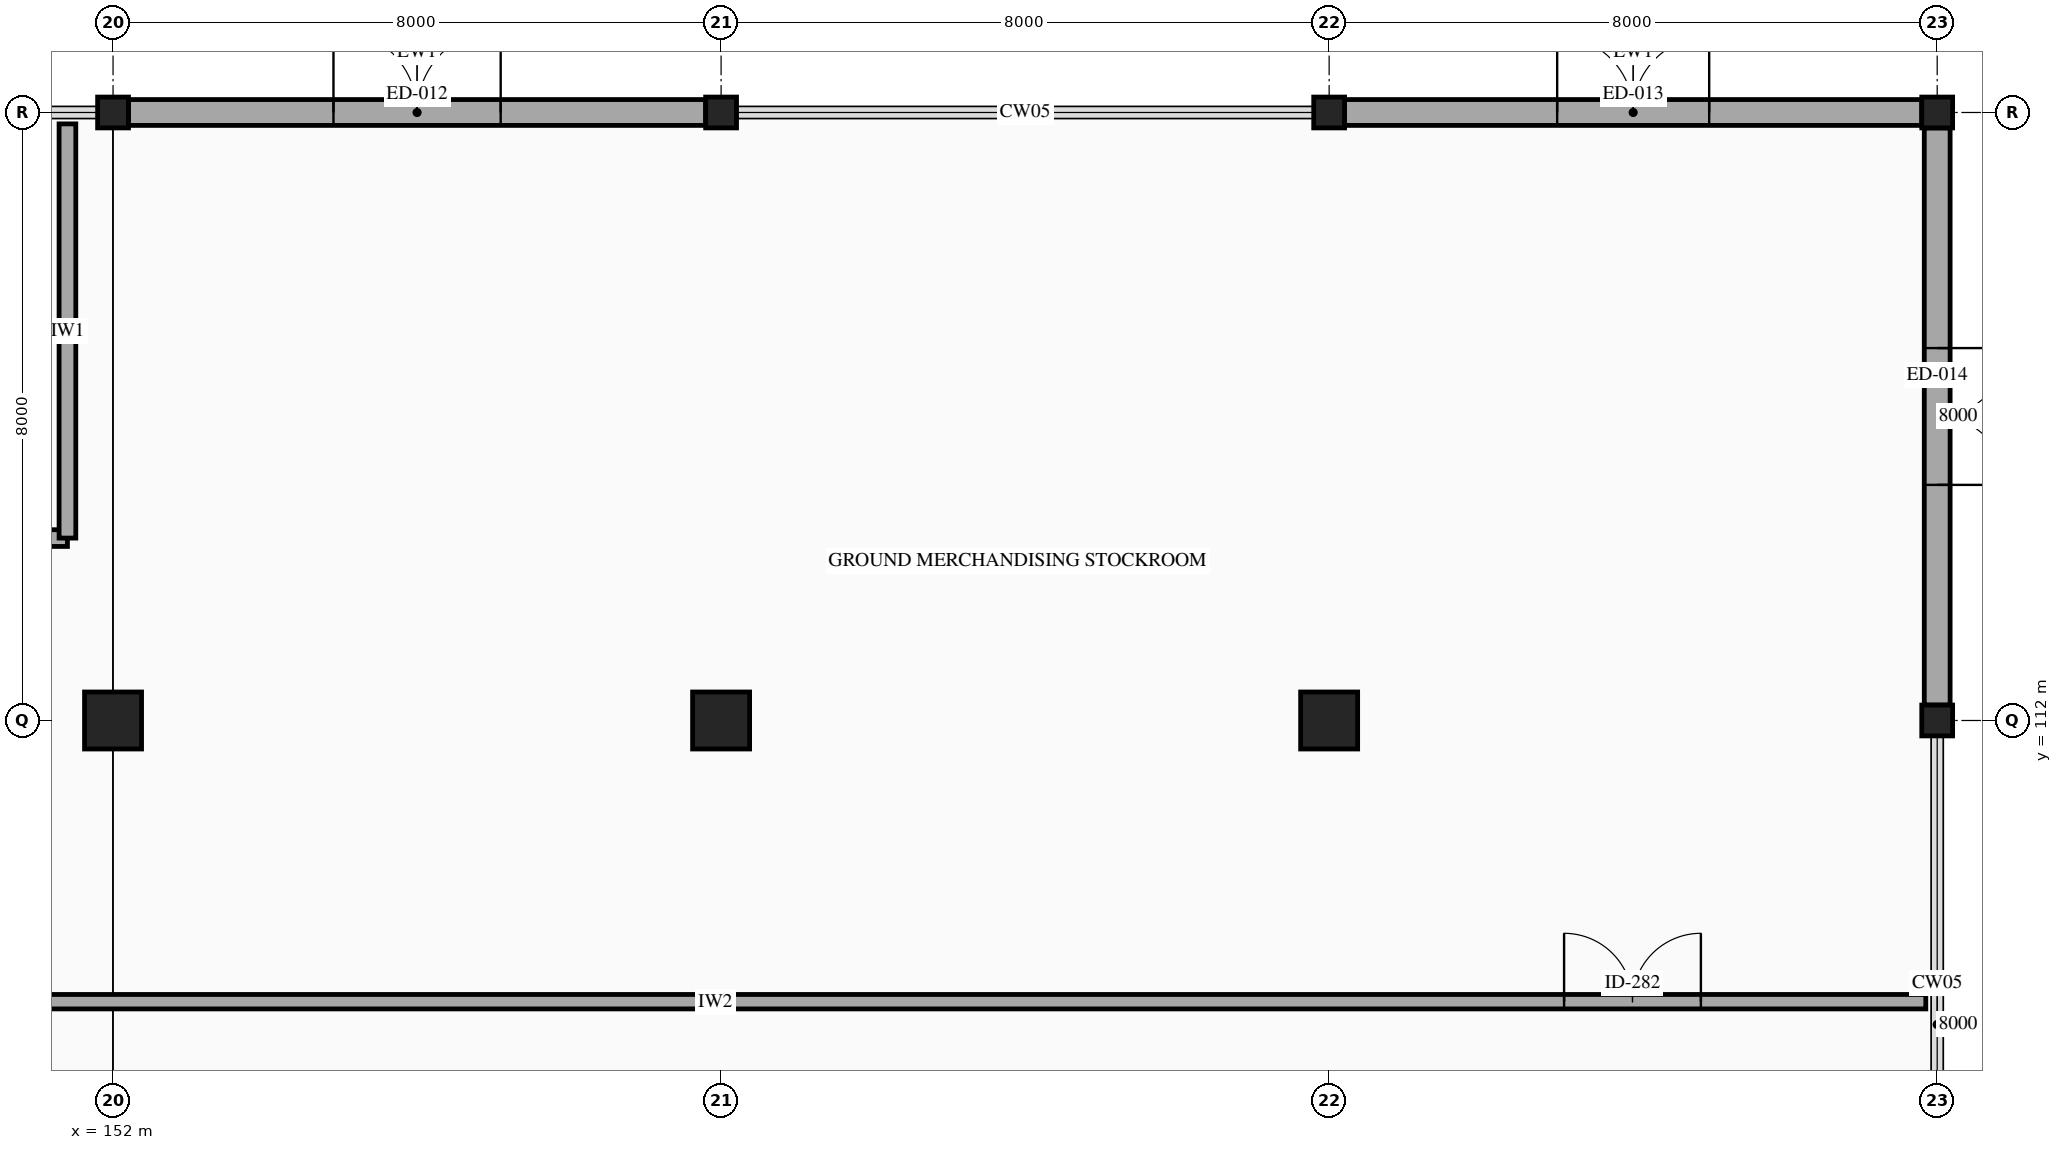
"""IFC4 building model, lengths in metres.
Left out: names, types, materials, properties, quantities, classifications, styles, units other than length and angle.
Written with IfcOpenShell. Run it as: python <this file> out.ifc"""

import sys

from ifc_helpers import new_model, si_unit, direction, frame, frame_2d, origin, origin_2d, place, context, subcontext, project, spatial, rectangle, hollow_rectangle, extrude, element, fill, save


model = new_model("IFC4")
c1 = context("Model", 3, precision=1e-05, world=origin(), true_north=direction((0.0, 1.0)))
c2 = subcontext(c1, "Body", "Model", "MODEL_VIEW")
j1 = project(units=[si_unit("LENGTHUNIT", "METRE"), si_unit("PLANEANGLEUNIT", "RADIAN")], contexts=[c1])
p1 = place(None, origin())
s1 = spatial("IfcSite", under=j1, at=p1, CompositionType="ELEMENT")
p2 = place(p1, origin())
s2 = spatial("IfcBuilding", under=s1, at=p2, CompositionType="ELEMENT")
p3 = place(p2, origin())
s3 = spatial("IfcBuildingStorey", under=s2, at=p3, CompositionType="ELEMENT", Elevation=0.0)
p4 = place(p3, frame((152.0, 112.0, 0.0), z_axis=(0.0, 0.0, 1.0), x_axis=(1.0, 0.0, 0.0)))
e1 = element("IfcColumn", 1, at=p4, inside=s3, PredefinedType="COLUMN", context=c2, shape_type="SweptSolid", body=[
    extrude(rectangle(XDim=0.75, YDim=0.75, at=origin_2d()), origin(), (0.0, 0.0, 1.0), 5.6),
])
p5 = place(p3, frame((152.0, 120.0, 0.0), z_axis=(0.0, 0.0, 1.0), x_axis=(1.0, 0.0, 0.0)))
e2 = element("IfcColumn", 2, at=p5, inside=s3, PredefinedType="COLUMN", context=c2, shape_type="SweptSolid", body=[
    extrude(hollow_rectangle(XDim=0.406, YDim=0.406, WallThickness=0.015, InnerFilletRadius=0.015, OuterFilletRadius=0.029, at=origin_2d()), origin(), (0.0, 0.0, 1.0), 5.6),
])
p6 = place(p3, frame((160.0, 112.0, 0.0), z_axis=(0.0, 0.0, 1.0), x_axis=(1.0, 0.0, 0.0)))
e3 = element("IfcColumn", 3, at=p6, inside=s3, PredefinedType="COLUMN", context=c2, shape_type="SweptSolid", body=[
    extrude(rectangle(XDim=0.75, YDim=0.75, at=origin_2d()), origin(), (0.0, 0.0, 1.0), 5.6),
])
p7 = place(p3, frame((160.0, 120.0, 0.0), z_axis=(0.0, 0.0, 1.0), x_axis=(1.0, 0.0, 0.0)))
e4 = element("IfcColumn", 4, at=p7, inside=s3, PredefinedType="COLUMN", context=c2, shape_type="SweptSolid", body=[
    extrude(hollow_rectangle(XDim=0.406, YDim=0.406, WallThickness=0.015, InnerFilletRadius=0.015, OuterFilletRadius=0.029, at=origin_2d()), origin(), (0.0, 0.0, 1.0), 5.6),
])
p8 = place(p3, frame((168.0, 112.0, 0.0), z_axis=(0.0, 0.0, 1.0), x_axis=(1.0, 0.0, 0.0)))
e5 = element("IfcColumn", 5, at=p8, inside=s3, PredefinedType="COLUMN", context=c2, shape_type="SweptSolid", body=[
    extrude(rectangle(XDim=0.75, YDim=0.75, at=origin_2d()), origin(), (0.0, 0.0, 1.0), 5.6),
])
for number, where, z_axis, x_axis in (
    (6, (168.0, 120.0, 0.0), (0.0, 0.0, 1.0), (1.0, 0.0, 0.0)),
    (7, (176.0, 112.0, 0.0), (0.0, 0.0, 1.0), (1.0, 0.0, 0.0)),
    (8, (176.0, 120.0, 0.0), (0.0, 0.0, 1.0), (1.0, 0.0, 0.0)),
):
    element("IfcColumn", number, at=place(p3, frame(where, z_axis=z_axis, x_axis=x_axis)), inside=s3, PredefinedType="COLUMN", context=c2, shape_type="SweptSolid", body=[
        extrude(hollow_rectangle(XDim=0.406, YDim=0.406, WallThickness=0.015, InnerFilletRadius=0.015, OuterFilletRadius=0.029, at=origin_2d()), origin(), (0.0, 0.0, 1.0), 5.6),
    ])
p9 = place(p3, frame((152.203, 120.0, 0.0), z_axis=(0.0, 0.0, 1.0), x_axis=(1.0, 0.0, 0.0)))
e9 = element("IfcWall", 9, at=p9, inside=s3, PredefinedType="STANDARD", context=c2, shape_type="SweptSolid", body=[
    extrude(rectangle(XDim=7.594, YDim=0.34, at=frame_2d((3.797, 0.0))), origin(), (0.0, 0.0, 1.0), 4.58),
])
p10 = place(p9, frame((2.697, 0.0, 0.0)))
e10 = element("IfcOpeningElement", 10, at=p10, cuts=e9, PredefinedType="OPENING", context=c2, shape_type="SweptSolid", body=[
    extrude(rectangle(XDim=2.2, YDim=2.45, at=frame_2d((1.1, 1.225))), frame((0.0, 0.18, 0.0), z_axis=(0.0, -1.0, 0.0), x_axis=(1.0, 0.0, 0.0)), (0.0, 0.0, 1.0), 0.36),
])
p11 = place(p3, frame((168.203, 120.0, 0.0), z_axis=(0.0, 0.0, 1.0), x_axis=(1.0, 0.0, 0.0)))
e11 = element("IfcWall", 11, at=p11, inside=s3, PredefinedType="STANDARD", context=c2, shape_type="SweptSolid", body=[
    extrude(rectangle(XDim=7.594, YDim=0.34, at=frame_2d((3.797, 0.0))), origin(), (0.0, 0.0, 1.0), 4.58),
])
p12 = place(p11, frame((2.797, 0.0, 0.0)))
e12 = element("IfcOpeningElement", 12, at=p12, cuts=e11, PredefinedType="OPENING", context=c2, shape_type="SweptSolid", body=[
    extrude(rectangle(XDim=2.0, YDim=2.35, at=frame_2d((1.0, 1.175))), frame((0.0, 0.18, 0.0), z_axis=(0.0, -1.0, 0.0), x_axis=(1.0, 0.0, 0.0)), (0.0, 0.0, 1.0), 0.36),
])
p13 = place(p3, frame((176.0, 119.797, 0.0), z_axis=(0.0, 0.0, 1.0), x_axis=(0.0, -1.0, 0.0)))
e13 = element("IfcWall", 13, at=p13, inside=s3, PredefinedType="STANDARD", context=c2, shape_type="SweptSolid", body=[
    extrude(rectangle(XDim=7.594, YDim=0.34, at=frame_2d((3.797, 0.0))), origin(), (0.0, 0.0, 1.0), 4.58),
])
p14 = place(p13, frame((2.897, 0.0, 0.0)))
e14 = element("IfcOpeningElement", 14, at=p14, cuts=e13, PredefinedType="OPENING", context=c2, shape_type="SweptSolid", body=[
    extrude(rectangle(XDim=1.8, YDim=2.3, at=frame_2d((0.9, 1.15))), frame((0.0, 0.18, 0.0), z_axis=(0.0, -1.0, 0.0), x_axis=(1.0, 0.0, 0.0)), (0.0, 0.0, 1.0), 0.36),
])
p15 = place(p3, frame((144.0, 114.4, 0.0), z_axis=(0.0, 0.0, 1.0), x_axis=(1.0, 0.0, 0.0)))
e15 = element("IfcWall", 15, at=p15, inside=s3, PredefinedType="PARTITIONING", context=c2, shape_type="SweptSolid", body=[
    extrude(rectangle(XDim=7.4, YDim=0.22, at=frame_2d((3.7, 0.0))), origin(), (0.0, 0.0, 1.0), 4.58),
])
p16 = place(p15, frame((3.579, 0.0, 0.0)))
e16 = element("IfcOpeningElement", 16, at=p16, cuts=e15, PredefinedType="OPENING", context=c2, shape_type="SweptSolid", body=[
    extrude(rectangle(XDim=1.05, YDim=2.15, at=frame_2d((0.525, 1.075))), frame((0.0, 0.12, 0.0), z_axis=(0.0, -1.0, 0.0), x_axis=(1.0, 0.0, 0.0)), (0.0, 0.0, 1.0), 0.24),
])
p17 = place(p3, frame((151.4, 114.4, 0.0), z_axis=(0.0, 0.0, 1.0), x_axis=(0.0, 1.0, 0.0)))
e17 = element("IfcWall", 17, at=p17, inside=s3, PredefinedType="PARTITIONING", context=c2, shape_type="SweptSolid", body=[
    extrude(rectangle(XDim=5.45, YDim=0.22, at=frame_2d((2.725, 0.0))), origin(), (0.0, 0.0, 1.0), 4.58),
])
p18 = place(p3, frame((144.0, 108.3, 0.0), z_axis=(0.0, 0.0, 1.0), x_axis=(1.0, 0.0, 0.0)))
e18 = element("IfcWall", 18, at=p18, inside=s3, PredefinedType="PARTITIONING", context=c2, shape_type="SweptSolid", body=[
    extrude(rectangle(XDim=31.85, YDim=0.19, at=frame_2d((15.925, 0.0))), origin(), (0.0, 0.0, 1.0), 4.58),
])
p19 = place(p18, frame((27.091, 0.0, 0.0)))
e19 = element("IfcOpeningElement", 19, at=p19, cuts=e18, PredefinedType="OPENING", context=c2, shape_type="SweptSolid", body=[
    extrude(rectangle(XDim=1.8, YDim=2.25, at=frame_2d((0.9, 1.125))), frame((0.0, 0.105, 0.0), z_axis=(0.0, -1.0, 0.0), x_axis=(1.0, 0.0, 0.0)), (0.0, 0.0, 1.0), 0.21),
])
p20 = place(p10, origin())
e20 = element("IfcDoor", 20, at=p20, inside=s3, OperationType="DOUBLE_DOOR_SINGLE_SWING", PredefinedType="DOOR", context=c2, shape_type="SweptSolid", body=[
    extrude(rectangle(XDim=2.2, YDim=2.45, at=frame_2d((1.1, 1.225))), frame((0.0, 0.025, 0.0), z_axis=(0.0, -1.0, 0.0), x_axis=(1.0, 0.0, 0.0)), (0.0, 0.0, 1.0), 0.05),
])
fill(e10, e20)
p21 = place(p12, origin())
e21 = element("IfcDoor", 21, at=p21, inside=s3, OperationType="DOUBLE_DOOR_SINGLE_SWING", PredefinedType="DOOR", context=c2, shape_type="SweptSolid", body=[
    extrude(rectangle(XDim=2.0, YDim=2.35, at=frame_2d((1.0, 1.175))), frame((0.0, 0.025, 0.0), z_axis=(0.0, -1.0, 0.0), x_axis=(1.0, 0.0, 0.0)), (0.0, 0.0, 1.0), 0.05),
])
fill(e12, e21)
p22 = place(p14, origin())
e22 = element("IfcDoor", 22, at=p22, inside=s3, OperationType="DOUBLE_DOOR_SINGLE_SWING", PredefinedType="DOOR", context=c2, shape_type="SweptSolid", body=[
    extrude(rectangle(XDim=1.8, YDim=2.3, at=frame_2d((0.9, 1.15))), frame((0.0, 0.025, 0.0), z_axis=(0.0, -1.0, 0.0), x_axis=(1.0, 0.0, 0.0)), (0.0, 0.0, 1.0), 0.05),
])
fill(e14, e22)
p23 = place(p19, origin())
e23 = element("IfcDoor", 23, at=p23, inside=s3, OperationType="DOUBLE_DOOR_SINGLE_SWING", PredefinedType="DOOR", context=c2, shape_type="SweptSolid", body=[
    extrude(rectangle(XDim=1.8, YDim=2.25, at=frame_2d((0.9, 1.125))), frame((0.0, 0.025, 0.0), z_axis=(0.0, -1.0, 0.0), x_axis=(1.0, 0.0, 0.0)), (0.0, 0.0, 1.0), 0.05),
])
fill(e19, e23)
save(model, sys.argv[1])
